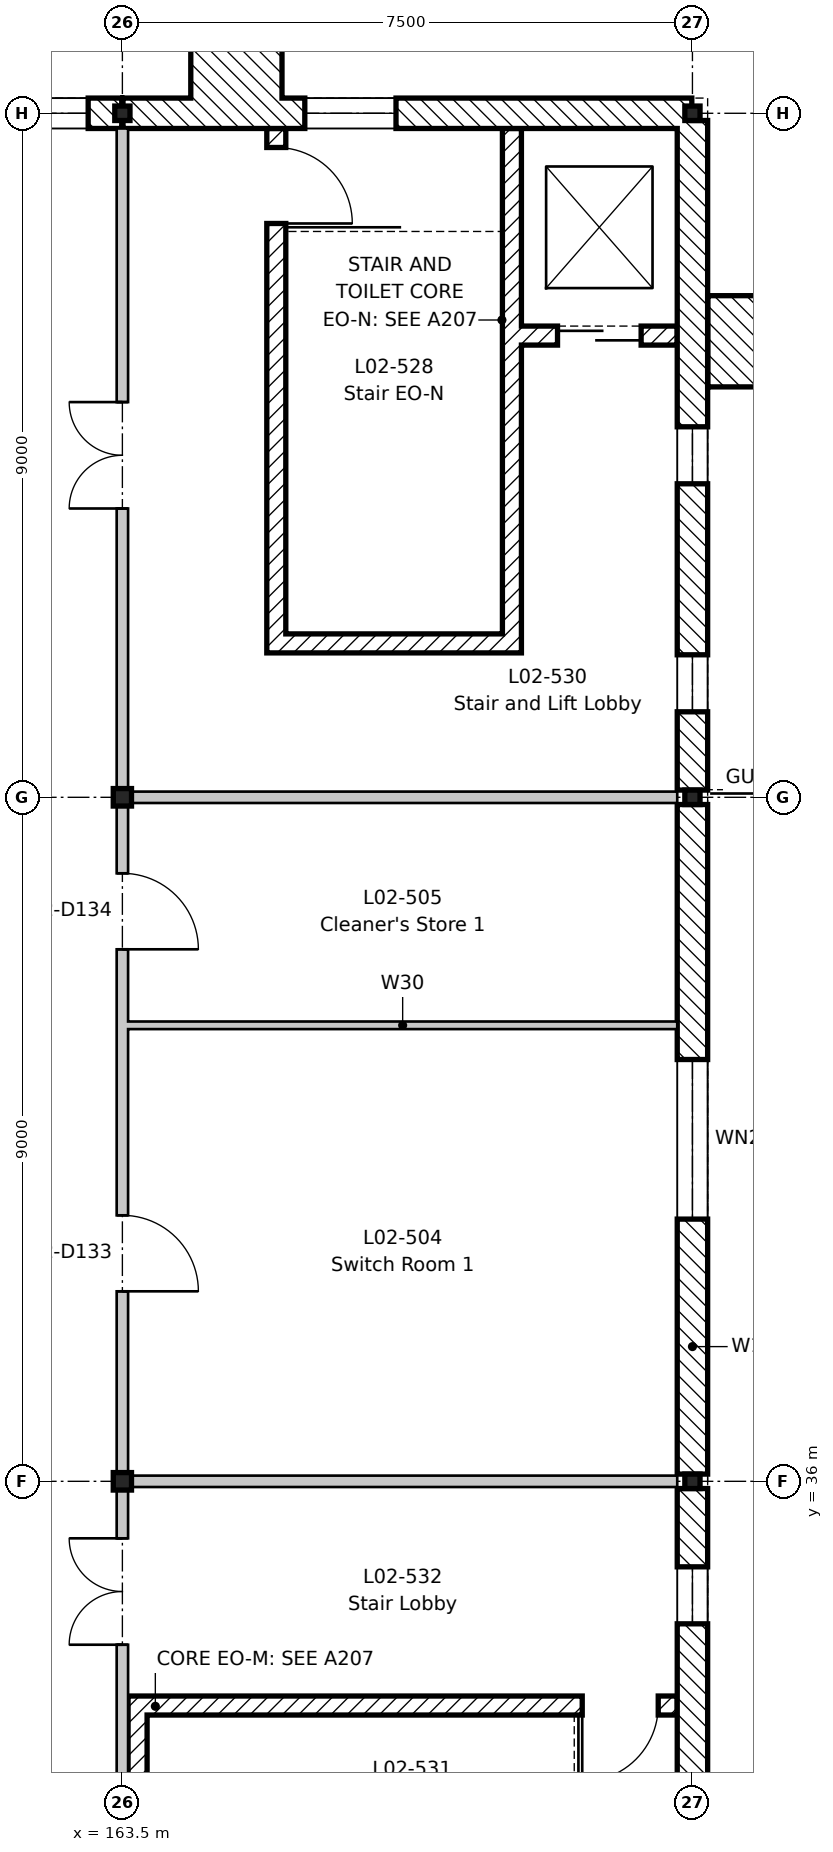
"""IFC4 building model, lengths in metres.
Left out: names, types, materials, properties, quantities, classifications, styles, units other than length and angle.
Written with IfcOpenShell. Run it as: python <this file> out.ifc"""

import sys

from ifc_helpers import new_model, si_unit, direction, frame, frame_2d, origin, origin_2d, place, context, subcontext, project, spatial, rectangle, i_section, extrude, element, fill, save


model = new_model("IFC4")
c1 = context("Model", 3, precision=1e-05, world=origin(), true_north=direction((0.0, 1.0)))
c2 = subcontext(c1, "Body", "Model", "MODEL_VIEW")
j1 = project(units=[si_unit("LENGTHUNIT", "METRE"), si_unit("PLANEANGLEUNIT", "RADIAN")], contexts=[c1])
p1 = place(None, origin())
s1 = spatial("IfcSite", under=j1, at=p1, CompositionType="ELEMENT")
p2 = place(p1, origin())
s2 = spatial("IfcBuilding", under=s1, at=p2, CompositionType="ELEMENT")
p3 = place(p2, frame((0.0, 0.0, 9.9)))
s3 = spatial("IfcBuildingStorey", under=s2, at=p3, CompositionType="ELEMENT", Elevation=9.9)
for number, where, z_axis, x_axis in (
    (1, (163.5, 36.0, -0.2), (0.0, 0.0, 1.0), (1.0, 0.0, 0.0)),
    (2, (163.5, 45.0, -0.2), (0.0, 0.0, 1.0), (1.0, 0.0, 0.0)),
):
    element("IfcColumn", number, at=place(p3, frame(where, z_axis=z_axis, x_axis=x_axis)), inside=s3, PredefinedType="COLUMN", context=c2, shape_type="SweptSolid", body=[
        extrude(i_section(OverallWidth=0.24, OverallDepth=0.23, WebThickness=0.008, FlangeThickness=0.012, FilletRadius=0.021, at=origin_2d()), origin(), (0.0, 0.0, 1.0), 4.45),
    ])
for number, where, z_axis, x_axis in (
    (3, (163.5, 54.0, -0.2), (0.0, 0.0, 1.0), (1.0, 0.0, 0.0)),
    (4, (171.0, 36.0, -0.2), (0.0, 0.0, 1.0), (1.0, 0.0, 0.0)),
    (5, (171.0, 45.0, -0.2), (0.0, 0.0, 1.0), (1.0, 0.0, 0.0)),
    (6, (171.0, 54.0, -0.2), (0.0, 0.0, 1.0), (1.0, 0.0, 0.0)),
):
    element("IfcColumn", number, at=place(p3, frame(where, z_axis=z_axis, x_axis=x_axis)), inside=s3, PredefinedType="COLUMN", context=c2, shape_type="SweptSolid", body=[
        extrude(i_section(OverallWidth=0.2, OverallDepth=0.19, WebThickness=0.007, FlangeThickness=0.01, FilletRadius=0.018, at=origin_2d()), origin(), (0.0, 0.0, 1.0), 4.45),
    ])
p4 = place(p3, frame((168.625, 46.9, 0.0), z_axis=(0.0, 0.0, 1.0), x_axis=(0.0, 1.0, 0.0)))
e7 = element("IfcWall", 7, at=p4, inside=s3, PredefinedType="SHEAR", context=c2, shape_type="SweptSolid", body=[
    extrude(rectangle(XDim=6.9, YDim=0.25, at=frame_2d((3.45, 0.0))), origin(), (0.0, 0.0, 1.0), 4.25),
])
p5 = place(p3, frame((165.525, 46.9, 0.0), z_axis=(0.0, 0.0, 1.0), x_axis=(0.0, 1.0, 0.0)))
e8 = element("IfcWall", 8, at=p5, inside=s3, PredefinedType="SHEAR", context=c2, shape_type="SweptSolid", body=[
    extrude(rectangle(XDim=6.9, YDim=0.25, at=frame_2d((3.45, 0.0))), origin(), (0.0, 0.0, 1.0), 4.25),
])
p6 = place(p5, frame((5.65, 0.0, 0.0)))
e9 = element("IfcOpeningElement", 9, at=p6, cuts=e8, PredefinedType="OPENING", context=c2, shape_type="SweptSolid", body=[
    extrude(rectangle(XDim=1.0, YDim=2.1, at=frame_2d((0.5, 1.05))), frame((0.0, 0.135, 0.0), z_axis=(0.0, -1.0, 0.0), x_axis=(1.0, 0.0, 0.0)), (0.0, 0.0, 1.0), 0.27),
])
p7 = place(p3, frame((165.65, 47.025, 0.0), z_axis=(0.0, 0.0, 1.0), x_axis=(1.0, 0.0, 0.0)))
e10 = element("IfcWall", 10, at=p7, inside=s3, PredefinedType="SHEAR", context=c2, shape_type="SweptSolid", body=[
    extrude(rectangle(XDim=2.85, YDim=0.25, at=frame_2d((1.425, 0.0))), origin(), (0.0, 0.0, 1.0), 4.25),
])
p8 = place(p3, frame((168.75, 51.075, 0.0), z_axis=(0.0, 0.0, 1.0), x_axis=(1.0, 0.0, 0.0)))
e11 = element("IfcWall", 11, at=p8, inside=s3, PredefinedType="SHEAR", context=c2, shape_type="SweptSolid", body=[
    extrude(rectangle(XDim=2.05, YDim=0.25, at=frame_2d((1.025, 0.0))), origin(), (0.0, 0.0, 1.0), 4.25),
])
p9 = place(p8, frame((0.475, 0.0, 0.0)))
e12 = element("IfcOpeningElement", 12, at=p9, cuts=e11, PredefinedType="OPENING", context=c2, shape_type="SweptSolid", body=[
    extrude(rectangle(XDim=1.1, YDim=2.1, at=frame_2d((0.55, 1.05))), frame((0.0, 0.135, 0.0), z_axis=(0.0, -1.0, 0.0), x_axis=(1.0, 0.0, 0.0)), (0.0, 0.0, 1.0), 0.27),
])
p10 = place(p3, frame((163.575, 33.05, 0.0), z_axis=(0.0, 0.0, 1.0), x_axis=(1.0, 0.0, 0.0)))
e13 = element("IfcWall", 13, at=p10, inside=s3, PredefinedType="SHEAR", context=c2, shape_type="SweptSolid", body=[
    extrude(rectangle(XDim=7.225, YDim=0.25, at=frame_2d((3.613, 0.0))), origin(), (0.0, 0.0, 1.0), 4.25),
])
p11 = place(p10, frame((5.975, 0.0, 0.0)))
e14 = element("IfcOpeningElement", 14, at=p11, cuts=e13, PredefinedType="OPENING", context=c2, shape_type="SweptSolid", body=[
    extrude(rectangle(XDim=1.0, YDim=2.1, at=frame_2d((0.5, 1.05))), frame((0.0, 0.135, 0.0), z_axis=(0.0, -1.0, 0.0), x_axis=(1.0, 0.0, 0.0)), (0.0, 0.0, 1.0), 0.27),
])
p12 = place(p3, frame((163.7, 30.075, 0.0), z_axis=(0.0, 0.0, 1.0), x_axis=(0.0, 1.0, 0.0)))
e15 = element("IfcWall", 15, at=p12, inside=s3, PredefinedType="SHEAR", context=c2, shape_type="SweptSolid", body=[
    extrude(rectangle(XDim=2.85, YDim=0.25, at=frame_2d((1.425, 0.0))), origin(), (0.0, 0.0, 1.0), 4.25),
])
p13 = place(p3, frame((160.508, 54.0, 0.0), z_axis=(0.0, 0.0, 1.0), x_axis=(1.0, 0.0, 0.0)))
e16 = element("IfcWall", 16, at=p13, inside=s3, PredefinedType="STANDARD", context=c2, shape_type="SweptSolid", body=[
    extrude(rectangle(XDim=2.983, YDim=0.4, at=frame_2d((1.492, 0.0))), origin(), (0.0, 0.0, 1.0), 4.05),
])
p14 = place(p13, frame((0.442, 0.0, 0.9)))
e17 = element("IfcOpeningElement", 17, at=p14, cuts=e16, PredefinedType="OPENING", context=c2, shape_type="SweptSolid", body=[
    extrude(rectangle(XDim=2.1, YDim=2.1, at=frame_2d((1.05, 1.05))), frame((0.0, 0.21, 0.0), z_axis=(0.0, -1.0, 0.0), x_axis=(1.0, 0.0, 0.0)), (0.0, 0.0, 1.0), 0.42),
])
p15 = place(p3, frame((163.508, 54.0, 0.0), z_axis=(0.0, 0.0, 1.0), x_axis=(1.0, 0.0, 0.0)))
e18 = element("IfcWall", 18, at=p15, inside=s3, PredefinedType="STANDARD", context=c2, shape_type="SweptSolid", body=[
    extrude(rectangle(XDim=7.483, YDim=0.4, at=frame_2d((3.742, 0.0))), origin(), (0.0, 0.0, 1.0), 3.92),
])
p16 = place(p15, frame((2.392, 0.0, 0.9)))
e19 = element("IfcOpeningElement", 19, at=p16, cuts=e18, PredefinedType="OPENING", context=c2, shape_type="SweptSolid", body=[
    extrude(rectangle(XDim=1.2, YDim=2.7, at=frame_2d((0.6, 1.35))), frame((0.0, 0.21, 0.0), z_axis=(0.0, -1.0, 0.0), x_axis=(1.0, 0.0, 0.0)), (0.0, 0.0, 1.0), 0.42),
])
p17 = place(p3, frame((171.0, 35.905, 0.0), z_axis=(0.0, 0.0, 1.0), x_axis=(0.0, -1.0, 0.0)))
e20 = element("IfcWall", 20, at=p17, inside=s3, PredefinedType="STANDARD", context=c2, shape_type="SweptSolid", body=[
    extrude(rectangle(XDim=8.81, YDim=0.4, at=frame_2d((4.405, 0.0))), origin(), (0.0, 0.0, 1.0), 3.85),
])
p18 = place(p17, frame((3.805, 0.0, 0.9)))
e21 = element("IfcOpeningElement", 21, at=p18, cuts=e20, PredefinedType="OPENING", context=c2, shape_type="SweptSolid", body=[
    extrude(rectangle(XDim=1.2, YDim=2.7, at=frame_2d((0.6, 1.35))), frame((0.0, 0.21, 0.0), z_axis=(0.0, -1.0, 0.0), x_axis=(1.0, 0.0, 0.0)), (0.0, 0.0, 1.0), 0.42),
])
p19 = place(p17, frame((1.03, 0.0, 1.5)))
e22 = element("IfcOpeningElement", 22, at=p19, cuts=e20, PredefinedType="OPENING", context=c2, shape_type="SweptSolid", body=[
    extrude(rectangle(XDim=0.75, YDim=1.2, at=frame_2d((0.375, 0.6))), frame((0.0, 0.21, 0.0), z_axis=(0.0, -1.0, 0.0), x_axis=(1.0, 0.0, 0.0)), (0.0, 0.0, 1.0), 0.42),
])
p20 = place(p3, frame((171.0, 44.905, 0.0), z_axis=(0.0, 0.0, 1.0), x_axis=(0.0, -1.0, 0.0)))
e23 = element("IfcWall", 23, at=p20, inside=s3, PredefinedType="STANDARD", context=c2, shape_type="SweptSolid", body=[
    extrude(rectangle(XDim=8.81, YDim=0.4, at=frame_2d((4.405, 0.0))), origin(), (0.0, 0.0, 1.0), 3.85),
])
p21 = place(p20, frame((3.355, 0.0, 0.9)))
e24 = element("IfcOpeningElement", 24, at=p21, cuts=e23, PredefinedType="OPENING", context=c2, shape_type="SweptSolid", body=[
    extrude(rectangle(XDim=2.1, YDim=2.1, at=frame_2d((1.05, 1.05))), frame((0.0, 0.21, 0.0), z_axis=(0.0, -1.0, 0.0), x_axis=(1.0, 0.0, 0.0)), (0.0, 0.0, 1.0), 0.42),
])
p22 = place(p3, frame((171.0, 53.905, 0.0), z_axis=(0.0, 0.0, 1.0), x_axis=(0.0, -1.0, 0.0)))
e25 = element("IfcWall", 25, at=p22, inside=s3, PredefinedType="STANDARD", context=c2, shape_type="SweptSolid", body=[
    extrude(rectangle(XDim=8.81, YDim=0.4, at=frame_2d((4.405, 0.0))), origin(), (0.0, 0.0, 1.0), 3.85),
])
p23 = place(p22, frame((7.03, 0.0, 1.5)))
e26 = element("IfcOpeningElement", 26, at=p23, cuts=e25, PredefinedType="OPENING", context=c2, shape_type="SweptSolid", body=[
    extrude(rectangle(XDim=0.75, YDim=1.2, at=frame_2d((0.375, 0.6))), frame((0.0, 0.21, 0.0), z_axis=(0.0, -1.0, 0.0), x_axis=(1.0, 0.0, 0.0)), (0.0, 0.0, 1.0), 0.42),
])
p24 = place(p22, frame((4.03, 0.0, 1.5)))
e27 = element("IfcOpeningElement", 27, at=p24, cuts=e25, PredefinedType="OPENING", context=c2, shape_type="SweptSolid", body=[
    extrude(rectangle(XDim=0.75, YDim=1.2, at=frame_2d((0.375, 0.6))), frame((0.0, 0.21, 0.0), z_axis=(0.0, -1.0, 0.0), x_axis=(1.0, 0.0, 0.0)), (0.0, 0.0, 1.0), 0.42),
])
for number, where, z_axis, x_axis in (
    (28, (164.4, 54.8, 0.0), (0.0, 0.0, 1.0), (1.0, 0.0, 0.0)),
    (29, (171.8, 50.4, 0.0), (0.0, 0.0, 1.0), (0.0, 1.0, 0.0)),
):
    element("IfcWall", number, at=place(p3, frame(where, z_axis=z_axis, x_axis=x_axis)), inside=s3, PredefinedType="STANDARD", context=c2, shape_type="SweptSolid", body=[
        extrude(rectangle(XDim=1.2, YDim=1.2, at=frame_2d((0.6, 0.0))), origin(), (0.0, 0.0, 1.0), 3.65),
    ])
p25 = place(p3, frame((163.575, 36.0, 0.0), z_axis=(0.0, 0.0, 1.0), x_axis=(1.0, 0.0, 0.0)))
e30 = element("IfcWall", 30, at=p25, inside=s3, PredefinedType="PARTITIONING", context=c2, shape_type="SweptSolid", body=[
    extrude(rectangle(XDim=7.225, YDim=0.15, at=frame_2d((3.613, 0.0))), origin(), (0.0, 0.0, 1.0), 3.9),
])
p26 = place(p3, frame((163.575, 42.0, 0.0), z_axis=(0.0, 0.0, 1.0), x_axis=(1.0, 0.0, 0.0)))
e31 = element("IfcWall", 31, at=p26, inside=s3, PredefinedType="PARTITIONING", context=c2, shape_type="SweptSolid", body=[
    extrude(rectangle(XDim=7.225, YDim=0.1, at=frame_2d((3.613, 0.0))), origin(), (0.0, 0.0, 1.0), 4.25),
])
p27 = place(p3, frame((163.575, 45.0, 0.0), z_axis=(0.0, 0.0, 1.0), x_axis=(1.0, 0.0, 0.0)))
e32 = element("IfcWall", 32, at=p27, inside=s3, PredefinedType="PARTITIONING", context=c2, shape_type="SweptSolid", body=[
    extrude(rectangle(XDim=7.225, YDim=0.15, at=frame_2d((3.613, 0.0))), origin(), (0.0, 0.0, 1.0), 3.9),
])
p28 = place(p3, frame((163.5, -8.8, 0.0), z_axis=(0.0, 0.0, 1.0), x_axis=(0.0, 1.0, 0.0)))
e33 = element("IfcWall", 33, at=p28, inside=s3, PredefinedType="PARTITIONING", context=c2, shape_type="SweptSolid", body=[
    extrude(rectangle(XDim=62.6, YDim=0.15, at=frame_2d((31.3, 0.0))), origin(), (0.0, 0.0, 1.0), 3.73),
])
p29 = place(p28, frame((21.6, 0.0, 0.0)))
e34 = element("IfcOpeningElement", 34, at=p29, cuts=e33, PredefinedType="OPENING", context=c2, shape_type="SweptSolid", body=[
    extrude(rectangle(XDim=1.4, YDim=2.1, at=frame_2d((0.7, 1.05))), frame((0.0, 0.085, 0.0), z_axis=(0.0, -1.0, 0.0), x_axis=(1.0, 0.0, 0.0)), (0.0, 0.0, 1.0), 0.17),
])
p30 = place(p28, frame((29.3, 0.0, 0.0)))
e35 = element("IfcOpeningElement", 35, at=p30, cuts=e33, PredefinedType="OPENING", context=c2, shape_type="SweptSolid", body=[
    extrude(rectangle(XDim=1.0, YDim=2.1, at=frame_2d((0.5, 1.05))), frame((0.0, 0.085, 0.0), z_axis=(0.0, -1.0, 0.0), x_axis=(1.0, 0.0, 0.0)), (0.0, 0.0, 1.0), 0.17),
])
p31 = place(p28, frame((33.8, 0.0, 0.0)))
e36 = element("IfcOpeningElement", 36, at=p31, cuts=e33, PredefinedType="OPENING", context=c2, shape_type="SweptSolid", body=[
    extrude(rectangle(XDim=1.0, YDim=2.1, at=frame_2d((0.5, 1.05))), frame((0.0, 0.085, 0.0), z_axis=(0.0, -1.0, 0.0), x_axis=(1.0, 0.0, 0.0)), (0.0, 0.0, 1.0), 0.17),
])
p32 = place(p28, frame((47.3, 0.0, 0.0)))
e37 = element("IfcOpeningElement", 37, at=p32, cuts=e33, PredefinedType="OPENING", context=c2, shape_type="SweptSolid", body=[
    extrude(rectangle(XDim=1.0, YDim=2.1, at=frame_2d((0.5, 1.05))), frame((0.0, 0.085, 0.0), z_axis=(0.0, -1.0, 0.0), x_axis=(1.0, 0.0, 0.0)), (0.0, 0.0, 1.0), 0.17),
])
p33 = place(p28, frame((51.8, 0.0, 0.0)))
e38 = element("IfcOpeningElement", 38, at=p33, cuts=e33, PredefinedType="OPENING", context=c2, shape_type="SweptSolid", body=[
    extrude(rectangle(XDim=1.0, YDim=2.1, at=frame_2d((0.5, 1.05))), frame((0.0, 0.085, 0.0), z_axis=(0.0, -1.0, 0.0), x_axis=(1.0, 0.0, 0.0)), (0.0, 0.0, 1.0), 0.17),
])
p34 = place(p28, frame((12.6, 0.0, 0.0)))
e39 = element("IfcOpeningElement", 39, at=p34, cuts=e33, PredefinedType="OPENING", context=c2, shape_type="SweptSolid", body=[
    extrude(rectangle(XDim=1.4, YDim=2.1, at=frame_2d((0.7, 1.05))), frame((0.0, 0.085, 0.0), z_axis=(0.0, -1.0, 0.0), x_axis=(1.0, 0.0, 0.0)), (0.0, 0.0, 1.0), 0.17),
])
p35 = place(p28, frame((3.6, 0.0, 0.0)))
e40 = element("IfcOpeningElement", 40, at=p35, cuts=e33, PredefinedType="OPENING", context=c2, shape_type="SweptSolid", body=[
    extrude(rectangle(XDim=1.4, YDim=2.1, at=frame_2d((0.7, 1.05))), frame((0.0, 0.085, 0.0), z_axis=(0.0, -1.0, 0.0), x_axis=(1.0, 0.0, 0.0)), (0.0, 0.0, 1.0), 0.17),
])
p36 = place(p28, frame((57.6, 0.0, 0.0)))
e41 = element("IfcOpeningElement", 41, at=p36, cuts=e33, PredefinedType="OPENING", context=c2, shape_type="SweptSolid", body=[
    extrude(rectangle(XDim=1.4, YDim=2.1, at=frame_2d((0.7, 1.05))), frame((0.0, 0.085, 0.0), z_axis=(0.0, -1.0, 0.0), x_axis=(1.0, 0.0, 0.0)), (0.0, 0.0, 1.0), 0.17),
])
p37 = place(p28, frame((36.75, 0.0, 0.0)))
e42 = element("IfcOpeningElement", 42, at=p37, cuts=e33, PredefinedType="OPENING", context=c2, shape_type="SweptSolid", body=[
    extrude(rectangle(XDim=1.0, YDim=2.1, at=frame_2d((0.5, 1.05))), frame((0.0, 0.085, 0.0), z_axis=(0.0, -1.0, 0.0), x_axis=(1.0, 0.0, 0.0)), (0.0, 0.0, 1.0), 0.17),
])
p38 = place(p28, frame((42.65, 0.0, 0.0)))
e43 = element("IfcOpeningElement", 43, at=p38, cuts=e33, PredefinedType="OPENING", context=c2, shape_type="SweptSolid", body=[
    extrude(rectangle(XDim=1.4, YDim=2.1, at=frame_2d((0.7, 1.05))), frame((0.0, 0.085, 0.0), z_axis=(0.0, -1.0, 0.0), x_axis=(1.0, 0.0, 0.0)), (0.0, 0.0, 1.0), 0.17),
])
p39 = place(p14, origin())
e44 = element("IfcWindow", 44, at=p39, inside=s3, PartitioningType="SINGLE_PANEL", PredefinedType="WINDOW", context=c2, shape_type="SweptSolid", body=[
    extrude(rectangle(XDim=2.1, YDim=2.1, at=frame_2d((1.05, 1.05))), frame((0.0, -0.12, 0.0), z_axis=(0.0, -1.0, 0.0), x_axis=(1.0, 0.0, 0.0)), (0.0, 0.0, 1.0), 0.06),
])
fill(e17, e44)
p40 = place(p16, origin())
e45 = element("IfcWindow", 45, at=p40, inside=s3, PartitioningType="SINGLE_PANEL", PredefinedType="WINDOW", context=c2, shape_type="SweptSolid", body=[
    extrude(rectangle(XDim=1.2, YDim=2.7, at=frame_2d((0.6, 1.35))), frame((0.0, -0.12, 0.0), z_axis=(0.0, -1.0, 0.0), x_axis=(1.0, 0.0, 0.0)), (0.0, 0.0, 1.0), 0.06),
])
fill(e19, e45)
p41 = place(p19, origin())
e46 = element("IfcWindow", 46, at=p41, inside=s3, PartitioningType="SINGLE_PANEL", PredefinedType="WINDOW", context=c2, shape_type="SweptSolid", body=[
    extrude(rectangle(XDim=0.75, YDim=1.2, at=frame_2d((0.375, 0.6))), frame((0.0, -0.12, 0.0), z_axis=(0.0, -1.0, 0.0), x_axis=(1.0, 0.0, 0.0)), (0.0, 0.0, 1.0), 0.06),
])
fill(e22, e46)
p42 = place(p21, origin())
e47 = element("IfcWindow", 47, at=p42, inside=s3, PartitioningType="SINGLE_PANEL", PredefinedType="WINDOW", context=c2, shape_type="SweptSolid", body=[
    extrude(rectangle(XDim=2.1, YDim=2.1, at=frame_2d((1.05, 1.05))), frame((0.0, -0.12, 0.0), z_axis=(0.0, -1.0, 0.0), x_axis=(1.0, 0.0, 0.0)), (0.0, 0.0, 1.0), 0.06),
])
fill(e24, e47)
p43 = place(p23, origin())
e48 = element("IfcWindow", 48, at=p43, inside=s3, PartitioningType="SINGLE_PANEL", PredefinedType="WINDOW", context=c2, shape_type="SweptSolid", body=[
    extrude(rectangle(XDim=0.75, YDim=1.2, at=frame_2d((0.375, 0.6))), frame((0.0, -0.12, 0.0), z_axis=(0.0, -1.0, 0.0), x_axis=(1.0, 0.0, 0.0)), (0.0, 0.0, 1.0), 0.06),
])
fill(e26, e48)
p44 = place(p24, origin())
e49 = element("IfcWindow", 49, at=p44, inside=s3, PartitioningType="SINGLE_PANEL", PredefinedType="WINDOW", context=c2, shape_type="SweptSolid", body=[
    extrude(rectangle(XDim=0.75, YDim=1.2, at=frame_2d((0.375, 0.6))), frame((0.0, -0.12, 0.0), z_axis=(0.0, -1.0, 0.0), x_axis=(1.0, 0.0, 0.0)), (0.0, 0.0, 1.0), 0.06),
])
fill(e27, e49)
p45 = place(p32, frame((1.0, 0.0, 0.0), z_axis=(0.0, 0.0, 1.0), x_axis=(-1.0, 0.0, 0.0)))
e50 = element("IfcDoor", 50, at=p45, inside=s3, OperationType="SINGLE_SWING_RIGHT", PredefinedType="DOOR", context=c2, shape_type="SweptSolid", body=[
    extrude(rectangle(XDim=1.0, YDim=2.1, at=frame_2d((0.5, 1.05))), frame((0.0, 0.025, 0.0), z_axis=(0.0, -1.0, 0.0), x_axis=(1.0, 0.0, 0.0)), (0.0, 0.0, 1.0), 0.05),
])
fill(e37, e50)
p46 = place(p33, frame((1.0, 0.0, 0.0), z_axis=(0.0, 0.0, 1.0), x_axis=(-1.0, 0.0, 0.0)))
e51 = element("IfcDoor", 51, at=p46, inside=s3, OperationType="SINGLE_SWING_RIGHT", PredefinedType="DOOR", context=c2, shape_type="SweptSolid", body=[
    extrude(rectangle(XDim=1.0, YDim=2.1, at=frame_2d((0.5, 1.05))), frame((0.0, 0.025, 0.0), z_axis=(0.0, -1.0, 0.0), x_axis=(1.0, 0.0, 0.0)), (0.0, 0.0, 1.0), 0.05),
])
fill(e38, e51)
p47 = place(p6, frame((1.0, 0.0, 0.0), z_axis=(0.0, 0.0, 1.0), x_axis=(-1.0, 0.0, 0.0)))
e52 = element("IfcDoor", 52, at=p47, inside=s3, OperationType="SINGLE_SWING_RIGHT", PredefinedType="DOOR", context=c2, shape_type="SweptSolid", body=[
    extrude(rectangle(XDim=1.0, YDim=2.1, at=frame_2d((0.5, 1.05))), frame((0.0, 0.025, 0.0), z_axis=(0.0, -1.0, 0.0), x_axis=(1.0, 0.0, 0.0)), (0.0, 0.0, 1.0), 0.05),
])
fill(e9, e52)
p48 = place(p36, origin())
e53 = element("IfcDoor", 53, at=p48, inside=s3, OperationType="DOUBLE_DOOR_SINGLE_SWING", PredefinedType="DOOR", context=c2, shape_type="SweptSolid", body=[
    extrude(rectangle(XDim=1.4, YDim=2.1, at=frame_2d((0.7, 1.05))), frame((0.0, 0.025, 0.0), z_axis=(0.0, -1.0, 0.0), x_axis=(1.0, 0.0, 0.0)), (0.0, 0.0, 1.0), 0.05),
])
fill(e41, e53)
p49 = place(p11, frame((1.0, 0.0, 0.0), z_axis=(0.0, 0.0, 1.0), x_axis=(-1.0, 0.0, 0.0)))
e54 = element("IfcDoor", 54, at=p49, inside=s3, OperationType="SINGLE_SWING_RIGHT", PredefinedType="DOOR", context=c2, shape_type="SweptSolid", body=[
    extrude(rectangle(XDim=1.0, YDim=2.1, at=frame_2d((0.5, 1.05))), frame((0.0, 0.025, 0.0), z_axis=(0.0, -1.0, 0.0), x_axis=(1.0, 0.0, 0.0)), (0.0, 0.0, 1.0), 0.05),
])
fill(e14, e54)
p50 = place(p38, origin())
e55 = element("IfcDoor", 55, at=p50, inside=s3, OperationType="DOUBLE_DOOR_SINGLE_SWING", PredefinedType="DOOR", context=c2, shape_type="SweptSolid", body=[
    extrude(rectangle(XDim=1.4, YDim=2.1, at=frame_2d((0.7, 1.05))), frame((0.0, 0.025, 0.0), z_axis=(0.0, -1.0, 0.0), x_axis=(1.0, 0.0, 0.0)), (0.0, 0.0, 1.0), 0.05),
])
fill(e43, e55)
p51 = place(p9, origin())
e56 = element("IfcDoor", 56, at=p51, inside=s3, OperationType="SLIDING_TO_LEFT", PredefinedType="DOOR", context=c2, shape_type="SweptSolid", body=[
    extrude(rectangle(XDim=1.1, YDim=2.1, at=frame_2d((0.55, 1.05))), frame((0.0, 0.025, 0.0), z_axis=(0.0, -1.0, 0.0), x_axis=(1.0, 0.0, 0.0)), (0.0, 0.0, 1.0), 0.05),
])
fill(e12, e56)
save(model, sys.argv[1])
